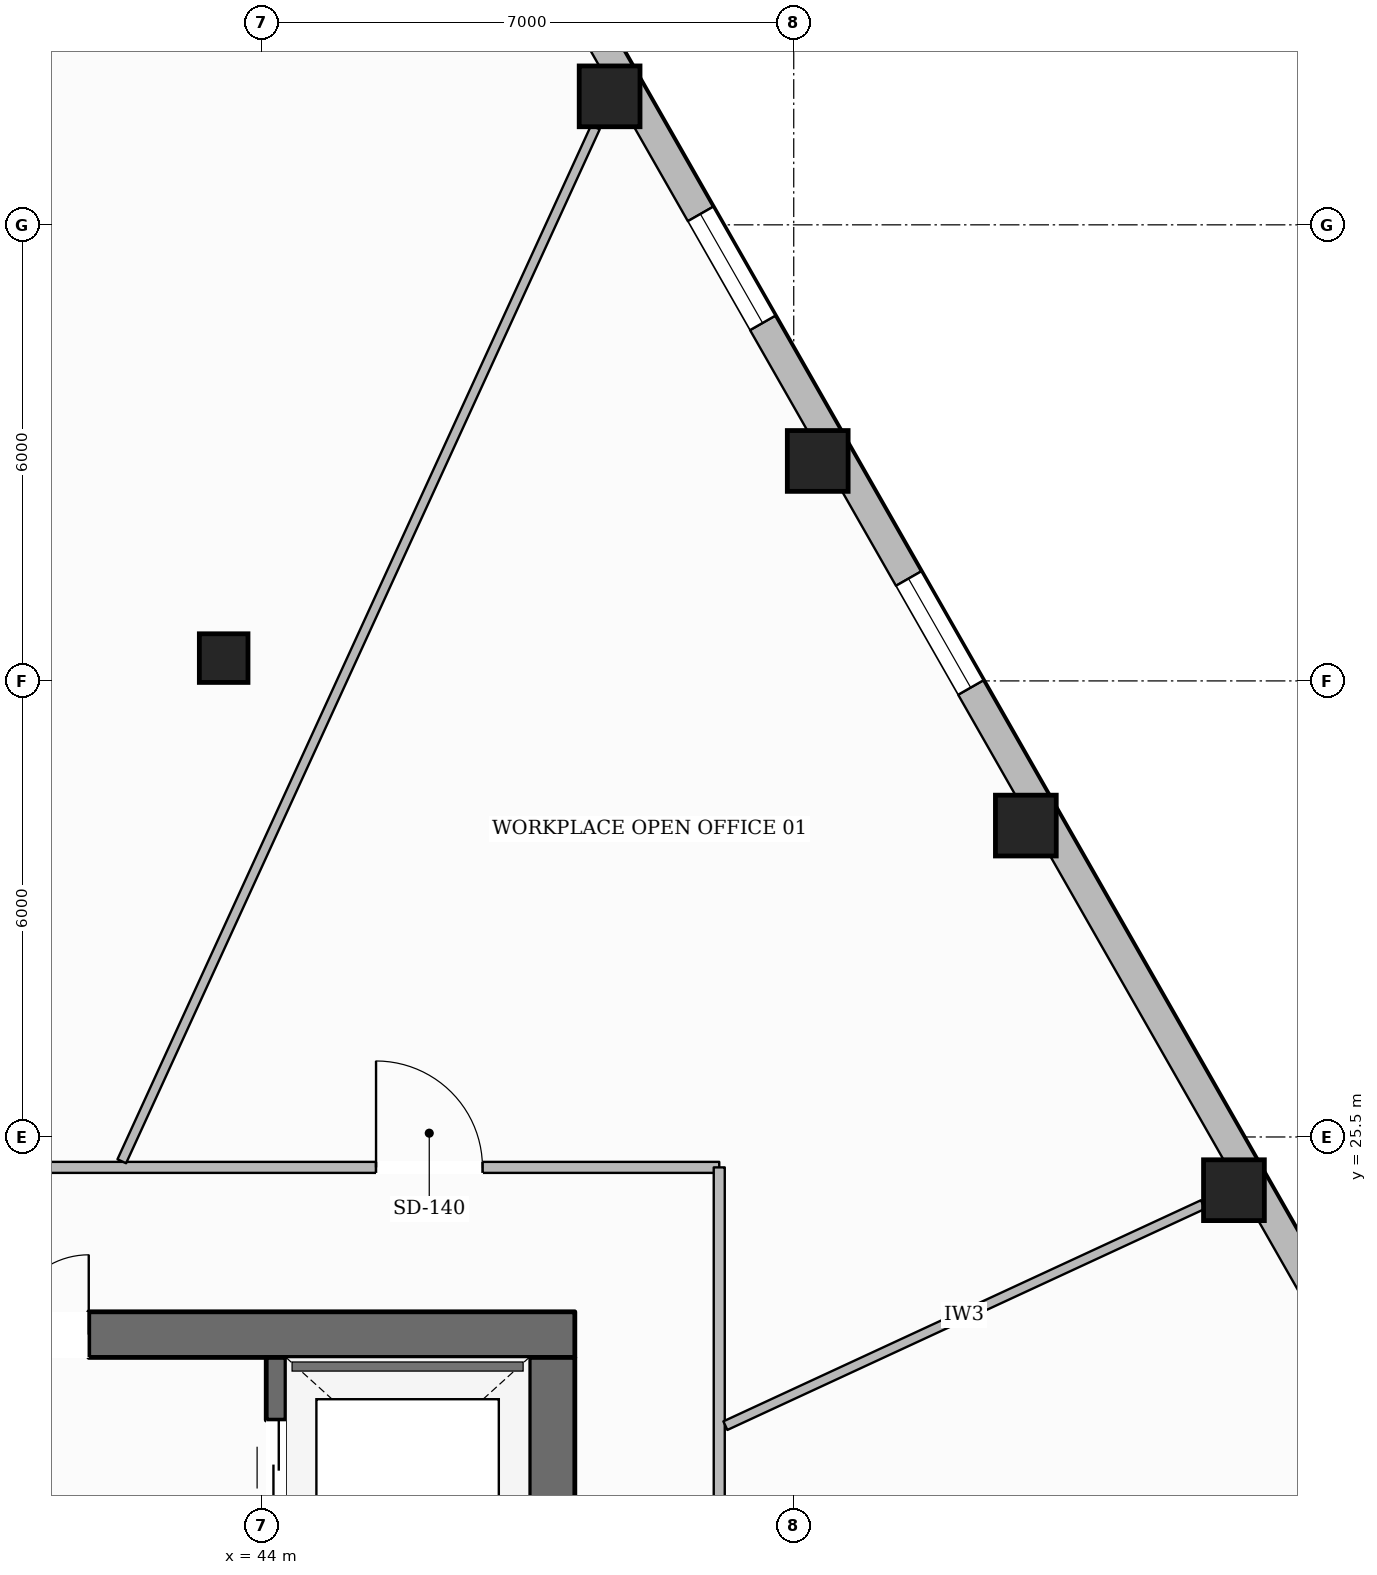
"""IFC4 building model, lengths in metres.
Left out: names, types, materials, properties, quantities, classifications, styles, units other than length and angle.
Written with IfcOpenShell. Run it as: python <this file> out.ifc"""

import sys

from ifc_helpers import new_model, si_unit, direction, frame, frame_2d, origin, origin_2d, place, context, subcontext, project, spatial, rectangle, hollow_rectangle, extrude, element, fill, save


model = new_model("IFC4")
c1 = context("Model", 3, precision=1e-05, world=origin(), true_north=direction((0.0, 1.0)))
c2 = subcontext(c1, "Body", "Model", "MODEL_VIEW")
j1 = project(units=[si_unit("LENGTHUNIT", "METRE"), si_unit("PLANEANGLEUNIT", "RADIAN")], contexts=[c1])
p1 = place(None, origin())
s1 = spatial("IfcSite", under=j1, at=p1, CompositionType="ELEMENT")
p2 = place(p1, origin())
s2 = spatial("IfcBuilding", under=s1, at=p2, CompositionType="ELEMENT")
p3 = place(p2, frame((0.0, 0.0, 29.1)))
s3 = spatial("IfcBuildingStorey", under=s2, at=p3, CompositionType="ELEMENT", Elevation=29.1)
p4 = place(p3, frame((27.88, 22.9, 0.0), z_axis=(0.0, 0.0, 1.0), x_axis=(1.0, 0.0, 0.0)))
e1 = element("IfcWall", 1, at=p4, inside=s3, PredefinedType="SOLIDWALL", context=c2, shape_type="SweptSolid", body=[
    extrude(rectangle(XDim=20.24, YDim=0.6, at=frame_2d((10.12, 0.0))), origin(), (0.0, 0.0, 1.0), 3.59),
])
p5 = place(p4, frame((6.395, 0.0, 0.0)))
e2 = element("IfcOpeningElement", 2, at=p5, cuts=e1, PredefinedType="OPENING", context=c2, shape_type="SweptSolid", body=[
    extrude(rectangle(XDim=1.05, YDim=2.15, at=frame_2d((0.525, 1.075))), frame((0.0, 0.31, 0.0), z_axis=(0.0, -1.0, 0.0), x_axis=(1.0, 0.0, 0.0)), (0.0, 0.0, 1.0), 0.62),
])
p6 = place(p4, frame((12.795, 0.0, 0.0)))
e3 = element("IfcOpeningElement", 3, at=p6, cuts=e1, PredefinedType="OPENING", context=c2, shape_type="SweptSolid", body=[
    extrude(rectangle(XDim=1.05, YDim=2.15, at=frame_2d((0.525, 1.075))), frame((0.0, 0.31, 0.0), z_axis=(0.0, -1.0, 0.0), x_axis=(1.0, 0.0, 0.0)), (0.0, 0.0, 1.0), 0.62),
])
p7 = place(p3, frame((47.82, 9.6, 0.0), z_axis=(0.0, 0.0, 1.0), x_axis=(0.0, 1.0, 0.0)))
e4 = element("IfcWall", 4, at=p7, inside=s3, PredefinedType="SOLIDWALL", context=c2, shape_type="SweptSolid", body=[
    extrude(rectangle(XDim=13.0, YDim=0.6, at=frame_2d((6.5, 0.0))), origin(), (0.0, 0.0, 1.0), 3.59),
])
p8 = place(p7, frame((0.2, 0.0, 0.0)))
e5 = element("IfcOpeningElement", 5, at=p8, cuts=e4, PredefinedType="OPENING", context=c2, shape_type="SweptSolid", body=[
    extrude(rectangle(XDim=1.1, YDim=2.15, at=frame_2d((0.55, 1.075))), frame((0.0, 0.31, 0.0), z_axis=(0.0, -1.0, 0.0), x_axis=(1.0, 0.0, 0.0)), (0.0, 0.0, 1.0), 0.62),
])
p9 = place(p7, frame((8.4, 0.0, 0.0)))
e6 = element("IfcOpeningElement", 6, at=p9, cuts=e4, PredefinedType="OPENING", context=c2, shape_type="SweptSolid", body=[
    extrude(rectangle(XDim=0.9, YDim=2.1, at=frame_2d((0.45, 1.05))), frame((0.0, 0.31, 0.0), z_axis=(0.0, -1.0, 0.0), x_axis=(1.0, 0.0, 0.0)), (0.0, 0.0, 1.0), 0.62),
])
p10 = place(p3, frame((44.19, 9.6, 0.0), z_axis=(0.0, 0.0, 1.0), x_axis=(0.0, 1.0, 0.0)))
e7 = element("IfcWall", 7, at=p10, inside=s3, PredefinedType="SHEAR", context=c2, shape_type="SweptSolid", body=[
    extrude(rectangle(XDim=13.0, YDim=0.26, at=frame_2d((6.5, 0.0))), origin(), (0.0, 0.0, 1.0), 3.59),
])
p11 = place(p10, frame((10.925, 0.0, 0.0)))
e8 = element("IfcOpeningElement", 8, at=p11, cuts=e7, PredefinedType="OPENING", context=c2, shape_type="SweptSolid", body=[
    extrude(rectangle(XDim=1.25, YDim=2.25, at=frame_2d((0.625, 1.125))), frame((0.0, 0.14, 0.0), z_axis=(0.0, -1.0, 0.0), x_axis=(1.0, 0.0, 0.0)), (0.0, 0.0, 1.0), 0.28),
])
for number, where, z_axis, x_axis in (
    (9, (56.792, 24.8, 0.0), (0.0, 0.0, 1.0), (1.0, 0.0, 0.0)),
    (10, (54.054, 29.597, 0.0), (0.0, 0.0, 1.0), (1.0, 0.0, 0.0)),
    (11, (51.316, 34.394, 0.0), (0.0, 0.0, 1.0), (1.0, 0.0, 0.0)),
    (12, (48.578, 39.19, 0.0), (0.0, 0.0, 1.0), (1.0, 0.0, 0.0)),
):
    element("IfcColumn", number, at=place(p3, frame(where, z_axis=z_axis, x_axis=x_axis)), inside=s3, PredefinedType="COLUMN", context=c2, shape_type="SweptSolid", body=[
        extrude(hollow_rectangle(XDim=0.8, YDim=0.8, WallThickness=0.036, at=origin_2d()), origin(), (0.0, 0.0, 1.0), 3.59),
    ])
p12 = place(p3, frame((43.5, 31.8, 0.0), z_axis=(0.0, 0.0, 1.0), x_axis=(1.0, 0.0, 0.0)))
e13 = element("IfcColumn", 13, at=p12, inside=s3, PredefinedType="COLUMN", context=c2, shape_type="SweptSolid", body=[
    extrude(hollow_rectangle(XDim=0.64, YDim=0.64, WallThickness=0.028, at=origin_2d()), origin(), (0.0, 0.0, 1.0), 3.59),
])
p13 = place(p3, frame((45.837, 44.537, 0.0), z_axis=(0.0, 0.0, 1.0), x_axis=(0.495711630902, -0.868487178367, 0.0)))
e14 = element("IfcWall", 14, at=p13, inside=s3, PredefinedType="STANDARD", context=c2, shape_type="SweptSolid", body=[
    extrude(rectangle(XDim=34.092, YDim=0.38, at=frame_2d((17.046, 0.0))), origin(), (0.0, 0.0, 1.0), 2.97),
])
p14 = place(p13, frame((30.031, 0.0, 0.65)))
e15 = element("IfcOpeningElement", 15, at=p14, cuts=e14, PredefinedType="OPENING", context=c2, shape_type="SweptSolid", body=[
    extrude(rectangle(XDim=1.65, YDim=1.75, at=frame_2d((0.825, 0.875))), frame((0.0, 0.2, 0.0), z_axis=(0.0, -1.0, 0.0), x_axis=(1.0, 0.0, 0.0)), (0.0, 0.0, 1.0), 0.4),
])
p15 = place(p13, frame((24.508, 0.0, 0.65)))
e16 = element("IfcOpeningElement", 16, at=p15, cuts=e14, PredefinedType="OPENING", context=c2, shape_type="SweptSolid", body=[
    extrude(rectangle(XDim=1.65, YDim=1.75, at=frame_2d((0.825, 0.875))), frame((0.0, 0.2, 0.0), z_axis=(0.0, -1.0, 0.0), x_axis=(1.0, 0.0, 0.0)), (0.0, 0.0, 1.0), 0.4),
])
p16 = place(p13, frame((13.462, 0.0, 0.65)))
e17 = element("IfcOpeningElement", 17, at=p16, cuts=e14, PredefinedType="OPENING", context=c2, shape_type="SweptSolid", body=[
    extrude(rectangle(XDim=1.65, YDim=1.75, at=frame_2d((0.825, 0.875))), frame((0.0, 0.2, 0.0), z_axis=(0.0, -1.0, 0.0), x_axis=(1.0, 0.0, 0.0)), (0.0, 0.0, 1.0), 0.4),
])
p17 = place(p13, frame((7.939, 0.0, 0.65)))
e18 = element("IfcOpeningElement", 18, at=p17, cuts=e14, PredefinedType="OPENING", context=c2, shape_type="SweptSolid", body=[
    extrude(rectangle(XDim=1.65, YDim=1.75, at=frame_2d((0.825, 0.875))), frame((0.0, 0.2, 0.0), z_axis=(0.0, -1.0, 0.0), x_axis=(1.0, 0.0, 0.0)), (0.0, 0.0, 1.0), 0.4),
])
p18 = place(p13, frame((2.415, 0.0, 0.65)))
e19 = element("IfcOpeningElement", 19, at=p18, cuts=e14, PredefinedType="OPENING", context=c2, shape_type="SweptSolid", body=[
    extrude(rectangle(XDim=1.65, YDim=1.75, at=frame_2d((0.825, 0.875))), frame((0.0, 0.2, 0.0), z_axis=(0.0, -1.0, 0.0), x_axis=(1.0, 0.0, 0.0)), (0.0, 0.0, 1.0), 0.4),
])
p19 = place(p3, frame((39.0, 25.1, 0.0), z_axis=(0.0, 0.0, 1.0), x_axis=(1.0, 0.0, 0.0)))
e20 = element("IfcWall", 20, at=p19, inside=s3, PredefinedType="PARTITIONING", context=c2, shape_type="SweptSolid", body=[
    extrude(rectangle(XDim=11.02, YDim=0.145, at=frame_2d((5.51, 0.0))), origin(), (0.0, 0.0, 1.0), 3.59),
])
p20 = place(p19, frame((6.505, 0.0, 0.0)))
e21 = element("IfcOpeningElement", 21, at=p20, cuts=e20, PredefinedType="OPENING", context=c2, shape_type="SweptSolid", body=[
    extrude(rectangle(XDim=1.4, YDim=2.2, at=frame_2d((0.7, 1.1))), frame((0.0, 0.083, 0.0), z_axis=(0.0, -1.0, 0.0), x_axis=(1.0, 0.0, 0.0)), (0.0, 0.0, 1.0), 0.165),
])
p21 = place(p3, frame((50.02, 25.1, 0.0), z_axis=(0.0, 0.0, 1.0), x_axis=(0.0, -1.0, 0.0)))
e22 = element("IfcWall", 22, at=p21, inside=s3, PredefinedType="PARTITIONING", context=c2, shape_type="SweptSolid", body=[
    extrude(rectangle(XDim=16.0, YDim=0.145, at=frame_2d((8.0, 0.0))), origin(), (0.0, 0.0, 1.0), 3.278),
])
p22 = place(p21, frame((8.916, 0.0, 0.0)))
e23 = element("IfcOpeningElement", 23, at=p22, cuts=e22, PredefinedType="OPENING", context=c2, shape_type="SweptSolid", body=[
    extrude(rectangle(XDim=1.4, YDim=2.2, at=frame_2d((0.7, 1.1))), frame((0.0, 0.083, 0.0), z_axis=(0.0, -1.0, 0.0), x_axis=(1.0, 0.0, 0.0)), (0.0, 0.0, 1.0), 0.165),
])
p23 = place(p3, frame((50.101, 21.702, 0.0), z_axis=(0.0, 0.0, 1.0), x_axis=(0.907458193586, 0.420142388832, 0.0)))
e24 = element("IfcWall", 24, at=p23, inside=s3, PredefinedType="PARTITIONING", context=c2, shape_type="SweptSolid", body=[
    extrude(rectangle(XDim=6.924, YDim=0.125, at=frame_2d((3.462, 0.0))), origin(), (0.0, 0.0, 1.0), 3.057),
])
p24 = place(p3, frame((42.16, 25.18, 0.0), z_axis=(0.0, 0.0, 1.0), x_axis=(0.416471526835, 0.90914875974, 0.0)))
e25 = element("IfcWall", 25, at=p24, inside=s3, PredefinedType="PARTITIONING", context=c2, shape_type="SweptSolid", body=[
    extrude(rectangle(XDim=14.961, YDim=0.125, at=frame_2d((7.481, 0.0))), origin(), (0.0, 0.0, 1.0), 3.057),
])
p25 = place(p16, origin())
e26 = element("IfcWindow", 26, at=p25, inside=s3, PartitioningType="SINGLE_PANEL", PredefinedType="WINDOW", context=c2, shape_type="SweptSolid", body=[
    extrude(rectangle(XDim=1.65, YDim=1.75, at=frame_2d((0.825, 0.875))), frame((0.0, 0.03, 0.0), z_axis=(0.0, -1.0, 0.0), x_axis=(1.0, 0.0, 0.0)), (0.0, 0.0, 1.0), 0.06),
])
fill(e17, e26)
p26 = place(p17, origin())
e27 = element("IfcWindow", 27, at=p26, inside=s3, PartitioningType="SINGLE_PANEL", PredefinedType="WINDOW", context=c2, shape_type="SweptSolid", body=[
    extrude(rectangle(XDim=1.65, YDim=1.75, at=frame_2d((0.825, 0.875))), frame((0.0, 0.03, 0.0), z_axis=(0.0, -1.0, 0.0), x_axis=(1.0, 0.0, 0.0)), (0.0, 0.0, 1.0), 0.06),
])
fill(e18, e27)
p27 = place(p6, origin())
e28 = element("IfcDoor", 28, at=p27, inside=s3, OperationType="SINGLE_SWING_RIGHT", PredefinedType="DOOR", context=c2, shape_type="SweptSolid", body=[
    extrude(rectangle(XDim=1.05, YDim=2.15, at=frame_2d((0.525, 1.075))), frame((0.0, 0.025, 0.0), z_axis=(0.0, -1.0, 0.0), x_axis=(1.0, 0.0, 0.0)), (0.0, 0.0, 1.0), 0.05),
])
fill(e3, e28)
p28 = place(p11, origin())
e29 = element("IfcDoor", 29, at=p28, inside=s3, OperationType="DOUBLE_DOOR_SLIDING", PredefinedType="DOOR", context=c2, shape_type="SweptSolid", body=[
    extrude(rectangle(XDim=1.25, YDim=2.25, at=frame_2d((0.625, 1.125))), frame((0.0, 0.025, 0.0), z_axis=(0.0, -1.0, 0.0), x_axis=(1.0, 0.0, 0.0)), (0.0, 0.0, 1.0), 0.05),
])
fill(e8, e29)
p29 = place(p20, origin())
e30 = element("IfcDoor", 30, at=p29, inside=s3, OperationType="SINGLE_SWING_LEFT", PredefinedType="DOOR", context=c2, shape_type="SweptSolid", body=[
    extrude(rectangle(XDim=1.4, YDim=2.2, at=frame_2d((0.7, 1.1))), frame((0.0, 0.025, 0.0), z_axis=(0.0, -1.0, 0.0), x_axis=(1.0, 0.0, 0.0)), (0.0, 0.0, 1.0), 0.05),
])
fill(e21, e30)
save(model, sys.argv[1])
